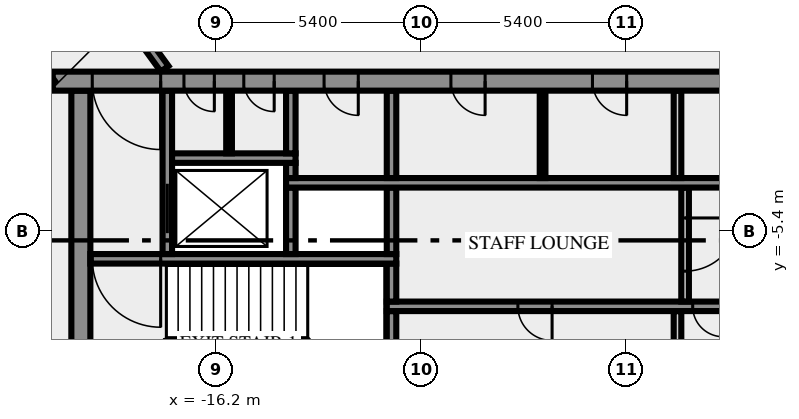
"""IFC4 building model, lengths in metres.
Left out: names, types, materials, properties, quantities, classifications, styles, units other than length and angle.
Written with IfcOpenShell. Run it as: python <this file> out.ifc"""

import sys

from ifc_helpers import new_model, si_unit, direction, frame, frame_2d, origin, place, context, subcontext, project, spatial, rectangle, extrude, element, fill, save


model = new_model("IFC4")
c1 = context("Model", 3, precision=1e-05, world=origin(), true_north=direction((0.0, 1.0)))
c2 = subcontext(c1, "Body", "Model", "MODEL_VIEW")
j1 = project(units=[si_unit("LENGTHUNIT", "METRE"), si_unit("PLANEANGLEUNIT", "RADIAN")], contexts=[c1])
p1 = place(None, origin())
s1 = spatial("IfcSite", under=j1, at=p1, CompositionType="ELEMENT")
p2 = place(p1, origin())
s2 = spatial("IfcBuilding", under=s1, at=p2, CompositionType="ELEMENT")
p3 = place(p2, frame((0.0, 0.0, 234.0)))
s3 = spatial("IfcBuildingStorey", under=s2, at=p3, CompositionType="ELEMENT", Elevation=234.0)
p4 = place(p3, frame((-19.75, -10.5, 0.0), z_axis=(0.0, 0.0, 1.0), x_axis=(0.0, 1.0, 0.0)))
e1 = element("IfcWall", 1, at=p4, inside=s3, PredefinedType="SHEAR", context=c2, shape_type="SweptSolid", body=[
    extrude(rectangle(XDim=8.8, YDim=0.5, at=frame_2d((4.4, 0.0))), origin(), (0.0, 0.0, 1.0), 3.65),
])
p5 = place(p3, frame((-11.575, -10.5, 0.0), z_axis=(0.0, 0.0, 1.0), x_axis=(0.0, 1.0, 0.0)))
e2 = element("IfcWall", 2, at=p5, inside=s3, PredefinedType="SHEAR", context=c2, shape_type="SweptSolid", body=[
    extrude(rectangle(XDim=3.0, YDim=0.25, at=frame_2d((1.5, 0.0))), origin(), (0.0, 0.0, 1.0), 3.65),
])
p6 = place(p3, frame((-4.05, -10.5, 0.0), z_axis=(0.0, 0.0, 1.0), x_axis=(0.0, 1.0, 0.0)))
e3 = element("IfcWall", 3, at=p6, inside=s3, PredefinedType="SOLIDWALL", context=c2, shape_type="SweptSolid", body=[
    extrude(rectangle(XDim=3.0, YDim=0.2, at=frame_2d((1.5, 0.0))), origin(), (0.0, 0.0, 1.0), 3.65),
])
p7 = place(p3, frame((11.7, -7.375, 0.0), z_axis=(0.0, 0.0, 1.0), x_axis=(-1.0, 0.0, 0.0)))
e4 = element("IfcWall", 4, at=p7, inside=s3, PredefinedType="SHEAR", context=c2, shape_type="SweptSolid", body=[
    extrude(rectangle(XDim=23.4, YDim=0.25, at=frame_2d((11.7, 0.0))), origin(), (0.0, 0.0, 1.0), 3.65),
])
p8 = place(p7, frame((19.05, 0.0, 0.0)))
e5 = element("IfcOpeningElement", 5, at=p8, cuts=e4, PredefinedType="OPENING", context=c2, shape_type="SweptSolid", body=[
    extrude(rectangle(XDim=0.9, YDim=2.1, at=frame_2d((0.45, 1.05))), frame((0.0, 0.135, 0.0), z_axis=(0.0, -1.0, 0.0), x_axis=(1.0, 0.0, 0.0)), (0.0, 0.0, 1.0), 0.27),
])
p9 = place(p7, frame((14.55, 0.0, 0.0)))
e6 = element("IfcOpeningElement", 6, at=p9, cuts=e4, PredefinedType="OPENING", context=c2, shape_type="SweptSolid", body=[
    extrude(rectangle(XDim=0.8, YDim=2.1, at=frame_2d((0.4, 1.05))), frame((0.0, 0.135, 0.0), z_axis=(0.0, -1.0, 0.0), x_axis=(1.0, 0.0, 0.0)), (0.0, 0.0, 1.0), 0.27),
])
p10 = place(p7, frame((12.8, 0.0, 0.0)))
e7 = element("IfcOpeningElement", 7, at=p10, cuts=e4, PredefinedType="OPENING", context=c2, shape_type="SweptSolid", body=[
    extrude(rectangle(XDim=0.9, YDim=2.1, at=frame_2d((0.45, 1.05))), frame((0.0, 0.135, 0.0), z_axis=(0.0, -1.0, 0.0), x_axis=(1.0, 0.0, 0.0)), (0.0, 0.0, 1.0), 0.27),
])
p11 = place(p7, frame((10.7, 0.0, 0.0)))
e8 = element("IfcOpeningElement", 8, at=p11, cuts=e4, PredefinedType="OPENING", context=c2, shape_type="SweptSolid", body=[
    extrude(rectangle(XDim=0.9, YDim=2.1, at=frame_2d((0.45, 1.05))), frame((0.0, 0.135, 0.0), z_axis=(0.0, -1.0, 0.0), x_axis=(1.0, 0.0, 0.0)), (0.0, 0.0, 1.0), 0.27),
])
p12 = place(p7, frame((8.35, 0.0, 0.0)))
e9 = element("IfcOpeningElement", 9, at=p12, cuts=e4, PredefinedType="OPENING", context=c2, shape_type="SweptSolid", body=[
    extrude(rectangle(XDim=1.1, YDim=2.1, at=frame_2d((0.55, 1.05))), frame((0.0, 0.135, 0.0), z_axis=(0.0, -1.0, 0.0), x_axis=(1.0, 0.0, 0.0)), (0.0, 0.0, 1.0), 0.27),
])
p13 = place(p7, frame((5.85, 0.0, 0.0)))
e10 = element("IfcOpeningElement", 10, at=p13, cuts=e4, PredefinedType="OPENING", context=c2, shape_type="SweptSolid", body=[
    extrude(rectangle(XDim=1.1, YDim=2.1, at=frame_2d((0.55, 1.05))), frame((0.0, 0.135, 0.0), z_axis=(0.0, -1.0, 0.0), x_axis=(1.0, 0.0, 0.0)), (0.0, 0.0, 1.0), 0.27),
])
p14 = place(p7, frame((3.35, 0.0, 0.0)))
e11 = element("IfcOpeningElement", 11, at=p14, cuts=e4, PredefinedType="OPENING", context=c2, shape_type="SweptSolid", body=[
    extrude(rectangle(XDim=1.1, YDim=2.1, at=frame_2d((0.55, 1.05))), frame((0.0, 0.135, 0.0), z_axis=(0.0, -1.0, 0.0), x_axis=(1.0, 0.0, 0.0)), (0.0, 0.0, 1.0), 0.27),
])
p15 = place(p7, frame((0.85, 0.0, 0.0)))
e12 = element("IfcOpeningElement", 12, at=p15, cuts=e4, PredefinedType="OPENING", context=c2, shape_type="SweptSolid", body=[
    extrude(rectangle(XDim=1.1, YDim=2.1, at=frame_2d((0.55, 1.05))), frame((0.0, 0.135, 0.0), z_axis=(0.0, -1.0, 0.0), x_axis=(1.0, 0.0, 0.0)), (0.0, 0.0, 1.0), 0.27),
])
p16 = place(p3, frame((-11.575, -7.25, 0.0), z_axis=(0.0, 0.0, 1.0), x_axis=(0.0, 1.0, 0.0)))
e13 = element("IfcWall", 13, at=p16, inside=s3, PredefinedType="SHEAR", context=c2, shape_type="SweptSolid", body=[
    extrude(rectangle(XDim=1.0, YDim=0.25, at=frame_2d((0.5, 0.0))), origin(), (0.0, 0.0, 1.0), 3.65),
])
p17 = place(p3, frame((-3.85, -4.25, 0.0), z_axis=(0.0, 0.0, 1.0), x_axis=(0.0, -1.0, 0.0)))
e14 = element("IfcWall", 14, at=p17, inside=s3, PredefinedType="SOLIDWALL", context=c2, shape_type="SweptSolid", body=[
    extrude(rectangle(XDim=3.0, YDim=0.2, at=frame_2d((1.5, 0.0))), origin(), (0.0, 0.0, 1.0), 3.65),
])
p18 = place(p17, frame((0.8, 0.0, 0.0)))
e15 = element("IfcOpeningElement", 15, at=p18, cuts=e14, PredefinedType="OPENING", context=c2, shape_type="SweptSolid", body=[
    extrude(rectangle(XDim=1.4, YDim=2.1, at=frame_2d((0.7, 1.05))), frame((0.0, 0.11, 0.0), z_axis=(0.0, -1.0, 0.0), x_axis=(1.0, 0.0, 0.0)), (0.0, 0.0, 1.0), 0.22),
])
p19 = place(p3, frame((-11.45, -6.125, 0.0), z_axis=(0.0, 0.0, 1.0), x_axis=(-1.0, 0.0, 0.0)))
e16 = element("IfcWall", 16, at=p19, inside=s3, PredefinedType="SHEAR", context=c2, shape_type="SweptSolid", body=[
    extrude(rectangle(XDim=8.05, YDim=0.25, at=frame_2d((4.025, 0.0))), origin(), (0.0, 0.0, 1.0), 3.65),
])
p20 = place(p19, frame((6.2, 0.0, 0.0)))
e17 = element("IfcOpeningElement", 17, at=p20, cuts=e16, PredefinedType="OPENING", context=c2, shape_type="SweptSolid", body=[
    extrude(rectangle(XDim=1.8, YDim=2.1, at=frame_2d((0.9, 1.05))), frame((0.0, 0.135, 0.0), z_axis=(0.0, -1.0, 0.0), x_axis=(1.0, 0.0, 0.0)), (0.0, 0.0, 1.0), 0.27),
])
p21 = place(p3, frame((-17.475, -6.0, 0.0), z_axis=(0.0, 0.0, 1.0), x_axis=(0.0, 1.0, 0.0)))
e18 = element("IfcWall", 18, at=p21, inside=s3, PredefinedType="SHEAR", context=c2, shape_type="SweptSolid", body=[
    extrude(rectangle(XDim=4.3, YDim=0.25, at=frame_2d((2.15, 0.0))), origin(), (0.0, 0.0, 1.0), 3.65),
])
p22 = place(p21, frame((0.55, 0.0, 0.0)))
e19 = element("IfcOpeningElement", 19, at=p22, cuts=e18, PredefinedType="OPENING", context=c2, shape_type="SweptSolid", body=[
    extrude(rectangle(XDim=1.3, YDim=2.1, at=frame_2d((0.65, 1.05))), frame((0.0, 0.135, 0.0), z_axis=(0.0, -1.0, 0.0), x_axis=(1.0, 0.0, 0.0)), (0.0, 0.0, 1.0), 0.27),
])
for number, where, z_axis, x_axis in (
    (20, (-14.225, -6.0, 0.0), (0.0, 0.0, 1.0), (0.0, 1.0, 0.0)),
    (21, (-11.575, -6.0, 0.0), (0.0, 0.0, 1.0), (0.0, 1.0, 0.0)),
):
    element("IfcWall", number, at=place(p3, frame(where, z_axis=z_axis, x_axis=x_axis)), inside=s3, PredefinedType="SHEAR", context=c2, shape_type="SweptSolid", body=[
        extrude(rectangle(XDim=1.75, YDim=0.25, at=frame_2d((0.875, 0.0))), origin(), (0.0, 0.0, 1.0), 3.65),
    ])
p23 = place(p3, frame((-14.35, -4.125, 0.0), z_axis=(0.0, 0.0, 1.0), x_axis=(1.0, 0.0, 0.0)))
e22 = element("IfcWall", 22, at=p23, inside=s3, PredefinedType="SHEAR", context=c2, shape_type="SweptSolid", body=[
    extrude(rectangle(XDim=12.7, YDim=0.25, at=frame_2d((6.35, 0.0))), origin(), (0.0, 0.0, 1.0), 3.65),
])
p24 = place(p3, frame((-14.225, -4.0, 0.0), z_axis=(0.0, 0.0, 1.0), x_axis=(0.0, 1.0, 0.0)))
e23 = element("IfcWall", 23, at=p24, inside=s3, PredefinedType="SHEAR", context=c2, shape_type="SweptSolid", body=[
    extrude(rectangle(XDim=0.4, YDim=0.25, at=frame_2d((0.2, 0.0))), origin(), (0.0, 0.0, 1.0), 3.65),
])
p25 = place(p3, frame((-11.575, -4.0, 0.0), z_axis=(0.0, 0.0, 1.0), x_axis=(0.0, 1.0, 0.0)))
e24 = element("IfcWall", 24, at=p25, inside=s3, PredefinedType="SHEAR", context=c2, shape_type="SweptSolid", body=[
    extrude(rectangle(XDim=2.3, YDim=0.25, at=frame_2d((1.15, 0.0))), origin(), (0.0, 0.0, 1.0), 3.65),
])
p26 = place(p3, frame((-7.6, -4.0, 0.0), z_axis=(0.0, 0.0, 1.0), x_axis=(0.0, 1.0, 0.0)))
e25 = element("IfcWall", 25, at=p26, inside=s3, PredefinedType="PARTITIONING", context=c2, shape_type="SweptSolid", body=[
    extrude(rectangle(XDim=2.3, YDim=0.15, at=frame_2d((1.15, 0.0))), origin(), (0.0, 0.0, 1.0), 3.65),
])
p27 = place(p3, frame((-4.05, -4.0, 0.0), z_axis=(0.0, 0.0, 1.0), x_axis=(0.0, 1.0, 0.0)))
e26 = element("IfcWall", 26, at=p27, inside=s3, PredefinedType="SOLIDWALL", context=c2, shape_type="SweptSolid", body=[
    extrude(rectangle(XDim=2.3, YDim=0.2, at=frame_2d((1.15, 0.0))), origin(), (0.0, 0.0, 1.0), 3.65),
])
p28 = place(p3, frame((-17.35, -3.475, 0.0), z_axis=(0.0, 0.0, 1.0), x_axis=(1.0, 0.0, 0.0)))
e27 = element("IfcWall", 27, at=p28, inside=s3, PredefinedType="SHEAR", context=c2, shape_type="SweptSolid", body=[
    extrude(rectangle(XDim=3.25, YDim=0.25, at=frame_2d((1.625, 0.0))), origin(), (0.0, 0.0, 1.0), 3.65),
])
p29 = place(p3, frame((-15.85, -3.35, 0.0), z_axis=(0.0, 0.0, 1.0), x_axis=(0.0, 1.0, 0.0)))
e28 = element("IfcWall", 28, at=p29, inside=s3, PredefinedType="PARTITIONING", context=c2, shape_type="SweptSolid", body=[
    extrude(rectangle(XDim=1.65, YDim=0.15, at=frame_2d((0.825, 0.0))), origin(), (0.0, 0.0, 1.0), 3.65),
])
p30 = place(p3, frame((-14.225, -3.35, 0.0), z_axis=(0.0, 0.0, 1.0), x_axis=(0.0, 1.0, 0.0)))
e29 = element("IfcWall", 29, at=p30, inside=s3, PredefinedType="SHEAR", context=c2, shape_type="SweptSolid", body=[
    extrude(rectangle(XDim=1.65, YDim=0.25, at=frame_2d((0.825, 0.0))), origin(), (0.0, 0.0, 1.0), 3.65),
])
p31 = place(p3, frame((20.49, -1.45, 0.0), z_axis=(0.0, 0.0, 1.0), x_axis=(-1.0, 0.0, 0.0)))
e30 = element("IfcWall", 30, at=p31, inside=s3, PredefinedType="SHEAR", context=c2, shape_type="SweptSolid", body=[
    extrude(rectangle(XDim=40.98, YDim=0.5, at=frame_2d((20.49, 0.0))), origin(), (0.0, 0.0, 1.0), 3.65),
])
p32 = place(p31, frame((38.14, 0.0, 0.0)))
e31 = element("IfcOpeningElement", 31, at=p32, cuts=e30, PredefinedType="OPENING", context=c2, shape_type="SweptSolid", body=[
    extrude(rectangle(XDim=1.8, YDim=2.1, at=frame_2d((0.9, 1.05))), frame((0.0, 0.26, 0.0), z_axis=(0.0, -1.0, 0.0), x_axis=(1.0, 0.0, 0.0)), (0.0, 0.0, 1.0), 0.52),
])
p33 = place(p31, frame((36.728, 0.0, 0.0)))
e32 = element("IfcOpeningElement", 32, at=p33, cuts=e30, PredefinedType="OPENING", context=c2, shape_type="SweptSolid", body=[
    extrude(rectangle(XDim=0.8, YDim=2.1, at=frame_2d((0.4, 1.05))), frame((0.0, 0.26, 0.0), z_axis=(0.0, -1.0, 0.0), x_axis=(1.0, 0.0, 0.0)), (0.0, 0.0, 1.0), 0.52),
])
p34 = place(p31, frame((35.153, 0.0, 0.0)))
e33 = element("IfcOpeningElement", 33, at=p34, cuts=e30, PredefinedType="OPENING", context=c2, shape_type="SweptSolid", body=[
    extrude(rectangle(XDim=0.8, YDim=2.1, at=frame_2d((0.4, 1.05))), frame((0.0, 0.26, 0.0), z_axis=(0.0, -1.0, 0.0), x_axis=(1.0, 0.0, 0.0)), (0.0, 0.0, 1.0), 0.52),
])
p35 = place(p31, frame((32.94, 0.0, 0.0)))
e34 = element("IfcOpeningElement", 34, at=p35, cuts=e30, PredefinedType="OPENING", context=c2, shape_type="SweptSolid", body=[
    extrude(rectangle(XDim=0.9, YDim=2.1, at=frame_2d((0.45, 1.05))), frame((0.0, 0.26, 0.0), z_axis=(0.0, -1.0, 0.0), x_axis=(1.0, 0.0, 0.0)), (0.0, 0.0, 1.0), 0.52),
])
p36 = place(p31, frame((29.603, 0.0, 0.0)))
e35 = element("IfcOpeningElement", 35, at=p36, cuts=e30, PredefinedType="OPENING", context=c2, shape_type="SweptSolid", body=[
    extrude(rectangle(XDim=0.9, YDim=2.1, at=frame_2d((0.45, 1.05))), frame((0.0, 0.26, 0.0), z_axis=(0.0, -1.0, 0.0), x_axis=(1.0, 0.0, 0.0)), (0.0, 0.0, 1.0), 0.52),
])
p37 = place(p31, frame((25.877, 0.0, 0.0)))
e36 = element("IfcOpeningElement", 36, at=p37, cuts=e30, PredefinedType="OPENING", context=c2, shape_type="SweptSolid", body=[
    extrude(rectangle(XDim=0.9, YDim=2.1, at=frame_2d((0.45, 1.05))), frame((0.0, 0.26, 0.0), z_axis=(0.0, -1.0, 0.0), x_axis=(1.0, 0.0, 0.0)), (0.0, 0.0, 1.0), 0.52),
])
p38 = place(p31, frame((19.59, 0.0, 0.0)))
e37 = element("IfcOpeningElement", 37, at=p38, cuts=e30, PredefinedType="OPENING", context=c2, shape_type="SweptSolid", body=[
    extrude(rectangle(XDim=2.0, YDim=2.1, at=frame_2d((1.0, 1.05))), frame((0.0, 0.26, 0.0), z_axis=(0.0, -1.0, 0.0), x_axis=(1.0, 0.0, 0.0)), (0.0, 0.0, 1.0), 0.52),
])
p39 = place(p31, frame((7.14, 0.0, 0.0)))
e38 = element("IfcOpeningElement", 38, at=p39, cuts=e30, PredefinedType="OPENING", context=c2, shape_type="SweptSolid", body=[
    extrude(rectangle(XDim=0.9, YDim=2.1, at=frame_2d((0.45, 1.05))), frame((0.0, 0.26, 0.0), z_axis=(0.0, -1.0, 0.0), x_axis=(1.0, 0.0, 0.0)), (0.0, 0.0, 1.0), 0.52),
])
p40 = place(p31, frame((4.19, 0.0, 0.0)))
e39 = element("IfcOpeningElement", 39, at=p40, cuts=e30, PredefinedType="OPENING", context=c2, shape_type="SweptSolid", body=[
    extrude(rectangle(XDim=0.9, YDim=2.1, at=frame_2d((0.45, 1.05))), frame((0.0, 0.26, 0.0), z_axis=(0.0, -1.0, 0.0), x_axis=(1.0, 0.0, 0.0)), (0.0, 0.0, 1.0), 0.52),
])
p41 = place(p31, frame((1.04, 0.0, 0.0)))
e40 = element("IfcOpeningElement", 40, at=p41, cuts=e30, PredefinedType="OPENING", context=c2, shape_type="SweptSolid", body=[
    extrude(rectangle(XDim=1.8, YDim=2.1, at=frame_2d((0.9, 1.05))), frame((0.0, 0.26, 0.0), z_axis=(0.0, -1.0, 0.0), x_axis=(1.0, 0.0, 0.0)), (0.0, 0.0, 1.0), 0.52),
])
p42 = place(p3, frame((-20.531, -1.523, 0.0), z_axis=(0.0, 0.0, 1.0), x_axis=(-0.587781654618, 0.809019608226, 0.0)))
e41 = element("IfcWall", 41, at=p42, inside=s3, PredefinedType="SOLIDWALL", context=c2, shape_type="SweptSolid", body=[
    extrude(rectangle(XDim=33.911, YDim=0.25, at=frame_2d((16.956, 0.0))), origin(), (0.0, 0.0, 1.0), 3.65),
])
p43 = place(p42, frame((14.216, 0.0, 0.0)))
e42 = element("IfcOpeningElement", 42, at=p43, cuts=e41, PredefinedType="OPENING", context=c2, shape_type="SweptSolid", body=[
    extrude(rectangle(XDim=1.0, YDim=2.1, at=frame_2d((0.5, 1.05))), frame((0.0, 0.135, 0.0), z_axis=(0.0, -1.0, 0.0), x_axis=(1.0, 0.0, 0.0)), (0.0, 0.0, 1.0), 0.27),
])
p44 = place(p42, frame((19.715, 0.0, 0.0)))
e43 = element("IfcOpeningElement", 43, at=p44, cuts=e41, PredefinedType="OPENING", context=c2, shape_type="SweptSolid", body=[
    extrude(rectangle(XDim=0.9, YDim=2.1, at=frame_2d((0.45, 1.05))), frame((0.0, 0.135, 0.0), z_axis=(0.0, -1.0, 0.0), x_axis=(1.0, 0.0, 0.0)), (0.0, 0.0, 1.0), 0.27),
])
p45 = place(p42, frame((21.316, 0.0, 0.0)))
e44 = element("IfcOpeningElement", 44, at=p45, cuts=e41, PredefinedType="OPENING", context=c2, shape_type="SweptSolid", body=[
    extrude(rectangle(XDim=0.9, YDim=2.1, at=frame_2d((0.45, 1.05))), frame((0.0, 0.135, 0.0), z_axis=(0.0, -1.0, 0.0), x_axis=(1.0, 0.0, 0.0)), (0.0, 0.0, 1.0), 0.27),
])
p46 = place(p3, frame((-38.32, 27.469, 0.0), z_axis=(0.0, 0.0, 1.0), x_axis=(0.587788021768, -0.809014982226, 0.0)))
e45 = element("IfcWall", 45, at=p46, inside=s3, PredefinedType="SOLIDWALL", context=c2, shape_type="SweptSolid", body=[
    extrude(rectangle(XDim=35.344, YDim=0.25, at=frame_2d((17.672, 0.0))), origin(), (0.0, 0.0, 1.0), 3.65),
])
p47 = place(p46, frame((31.003, 0.0, 0.0)))
e46 = element("IfcOpeningElement", 46, at=p47, cuts=e45, PredefinedType="OPENING", context=c2, shape_type="SweptSolid", body=[
    extrude(rectangle(XDim=0.9, YDim=2.1, at=frame_2d((0.45, 1.05))), frame((0.0, 0.135, 0.0), z_axis=(0.0, -1.0, 0.0), x_axis=(1.0, 0.0, 0.0)), (0.0, 0.0, 1.0), 0.27),
])
p48 = place(p46, frame((11.286, 0.0, 0.0)))
e47 = element("IfcOpeningElement", 47, at=p48, cuts=e45, PredefinedType="OPENING", context=c2, shape_type="SweptSolid", body=[
    extrude(rectangle(XDim=0.9, YDim=2.1, at=frame_2d((0.45, 1.05))), frame((0.0, 0.135, 0.0), z_axis=(0.0, -1.0, 0.0), x_axis=(1.0, 0.0, 0.0)), (0.0, 0.0, 1.0), 0.27),
])
p49 = place(p8, origin())
e48 = element("IfcDoor", 48, at=p49, inside=s3, OperationType="SINGLE_SWING_RIGHT", PredefinedType="DOOR", context=c2, shape_type="SweptSolid", body=[
    extrude(rectangle(XDim=0.9, YDim=2.1, at=frame_2d((0.45, 1.05))), frame((0.0, 0.025, 0.0), z_axis=(0.0, -1.0, 0.0), x_axis=(1.0, 0.0, 0.0)), (0.0, 0.0, 1.0), 0.05),
])
fill(e5, e48)
p50 = place(p9, origin())
e49 = element("IfcDoor", 49, at=p50, inside=s3, OperationType="SINGLE_SWING_RIGHT", PredefinedType="DOOR", context=c2, shape_type="SweptSolid", body=[
    extrude(rectangle(XDim=0.8, YDim=2.1, at=frame_2d((0.4, 1.05))), frame((0.0, 0.025, 0.0), z_axis=(0.0, -1.0, 0.0), x_axis=(1.0, 0.0, 0.0)), (0.0, 0.0, 1.0), 0.05),
])
fill(e6, e49)
p51 = place(p18, origin())
e50 = element("IfcDoor", 50, at=p51, inside=s3, OperationType="DOUBLE_DOOR_SINGLE_SWING", PredefinedType="DOOR", context=c2, shape_type="SweptSolid", body=[
    extrude(rectangle(XDim=1.4, YDim=2.1, at=frame_2d((0.7, 1.05))), frame((0.0, 0.025, 0.0), z_axis=(0.0, -1.0, 0.0), x_axis=(1.0, 0.0, 0.0)), (0.0, 0.0, 1.0), 0.05),
])
fill(e15, e50)
p52 = place(p20, origin())
e51 = element("IfcDoor", 51, at=p52, inside=s3, OperationType="DOUBLE_DOOR_SINGLE_SWING", PredefinedType="DOOR", context=c2, shape_type="SweptSolid", body=[
    extrude(rectangle(XDim=1.8, YDim=2.1, at=frame_2d((0.9, 1.05))), frame((0.0, 0.025, 0.0), z_axis=(0.0, -1.0, 0.0), x_axis=(1.0, 0.0, 0.0)), (0.0, 0.0, 1.0), 0.05),
])
fill(e17, e51)
p53 = place(p22, origin())
e52 = element("IfcDoor", 52, at=p53, inside=s3, OperationType="DOUBLE_DOOR_SLIDING", PredefinedType="DOOR", context=c2, shape_type="SweptSolid", body=[
    extrude(rectangle(XDim=1.3, YDim=2.1, at=frame_2d((0.65, 1.05))), frame((0.0, 0.025, 0.0), z_axis=(0.0, -1.0, 0.0), x_axis=(1.0, 0.0, 0.0)), (0.0, 0.0, 1.0), 0.05),
])
fill(e19, e52)
p54 = place(p32, origin())
e53 = element("IfcDoor", 53, at=p54, inside=s3, OperationType="DOUBLE_DOOR_SINGLE_SWING", PredefinedType="DOOR", context=c2, shape_type="SweptSolid", body=[
    extrude(rectangle(XDim=1.8, YDim=2.1, at=frame_2d((0.9, 1.05))), frame((0.0, 0.025, 0.0), z_axis=(0.0, -1.0, 0.0), x_axis=(1.0, 0.0, 0.0)), (0.0, 0.0, 1.0), 0.05),
])
fill(e31, e53)
p55 = place(p33, origin())
e54 = element("IfcDoor", 54, at=p55, inside=s3, OperationType="SINGLE_SWING_RIGHT", PredefinedType="DOOR", context=c2, shape_type="SweptSolid", body=[
    extrude(rectangle(XDim=0.8, YDim=2.1, at=frame_2d((0.4, 1.05))), frame((0.0, 0.025, 0.0), z_axis=(0.0, -1.0, 0.0), x_axis=(1.0, 0.0, 0.0)), (0.0, 0.0, 1.0), 0.05),
])
fill(e32, e54)
p56 = place(p34, origin())
e55 = element("IfcDoor", 55, at=p56, inside=s3, OperationType="SINGLE_SWING_RIGHT", PredefinedType="DOOR", context=c2, shape_type="SweptSolid", body=[
    extrude(rectangle(XDim=0.8, YDim=2.1, at=frame_2d((0.4, 1.05))), frame((0.0, 0.025, 0.0), z_axis=(0.0, -1.0, 0.0), x_axis=(1.0, 0.0, 0.0)), (0.0, 0.0, 1.0), 0.05),
])
fill(e33, e55)
p57 = place(p35, origin())
e56 = element("IfcDoor", 56, at=p57, inside=s3, OperationType="SINGLE_SWING_RIGHT", PredefinedType="DOOR", context=c2, shape_type="SweptSolid", body=[
    extrude(rectangle(XDim=0.9, YDim=2.1, at=frame_2d((0.45, 1.05))), frame((0.0, 0.025, 0.0), z_axis=(0.0, -1.0, 0.0), x_axis=(1.0, 0.0, 0.0)), (0.0, 0.0, 1.0), 0.05),
])
fill(e34, e56)
p58 = place(p36, origin())
e57 = element("IfcDoor", 57, at=p58, inside=s3, OperationType="SINGLE_SWING_RIGHT", PredefinedType="DOOR", context=c2, shape_type="SweptSolid", body=[
    extrude(rectangle(XDim=0.9, YDim=2.1, at=frame_2d((0.45, 1.05))), frame((0.0, 0.025, 0.0), z_axis=(0.0, -1.0, 0.0), x_axis=(1.0, 0.0, 0.0)), (0.0, 0.0, 1.0), 0.05),
])
fill(e35, e57)
p59 = place(p37, origin())
e58 = element("IfcDoor", 58, at=p59, inside=s3, OperationType="SINGLE_SWING_RIGHT", PredefinedType="DOOR", context=c2, shape_type="SweptSolid", body=[
    extrude(rectangle(XDim=0.9, YDim=2.1, at=frame_2d((0.45, 1.05))), frame((0.0, 0.025, 0.0), z_axis=(0.0, -1.0, 0.0), x_axis=(1.0, 0.0, 0.0)), (0.0, 0.0, 1.0), 0.05),
])
fill(e36, e58)
save(model, sys.argv[1])
